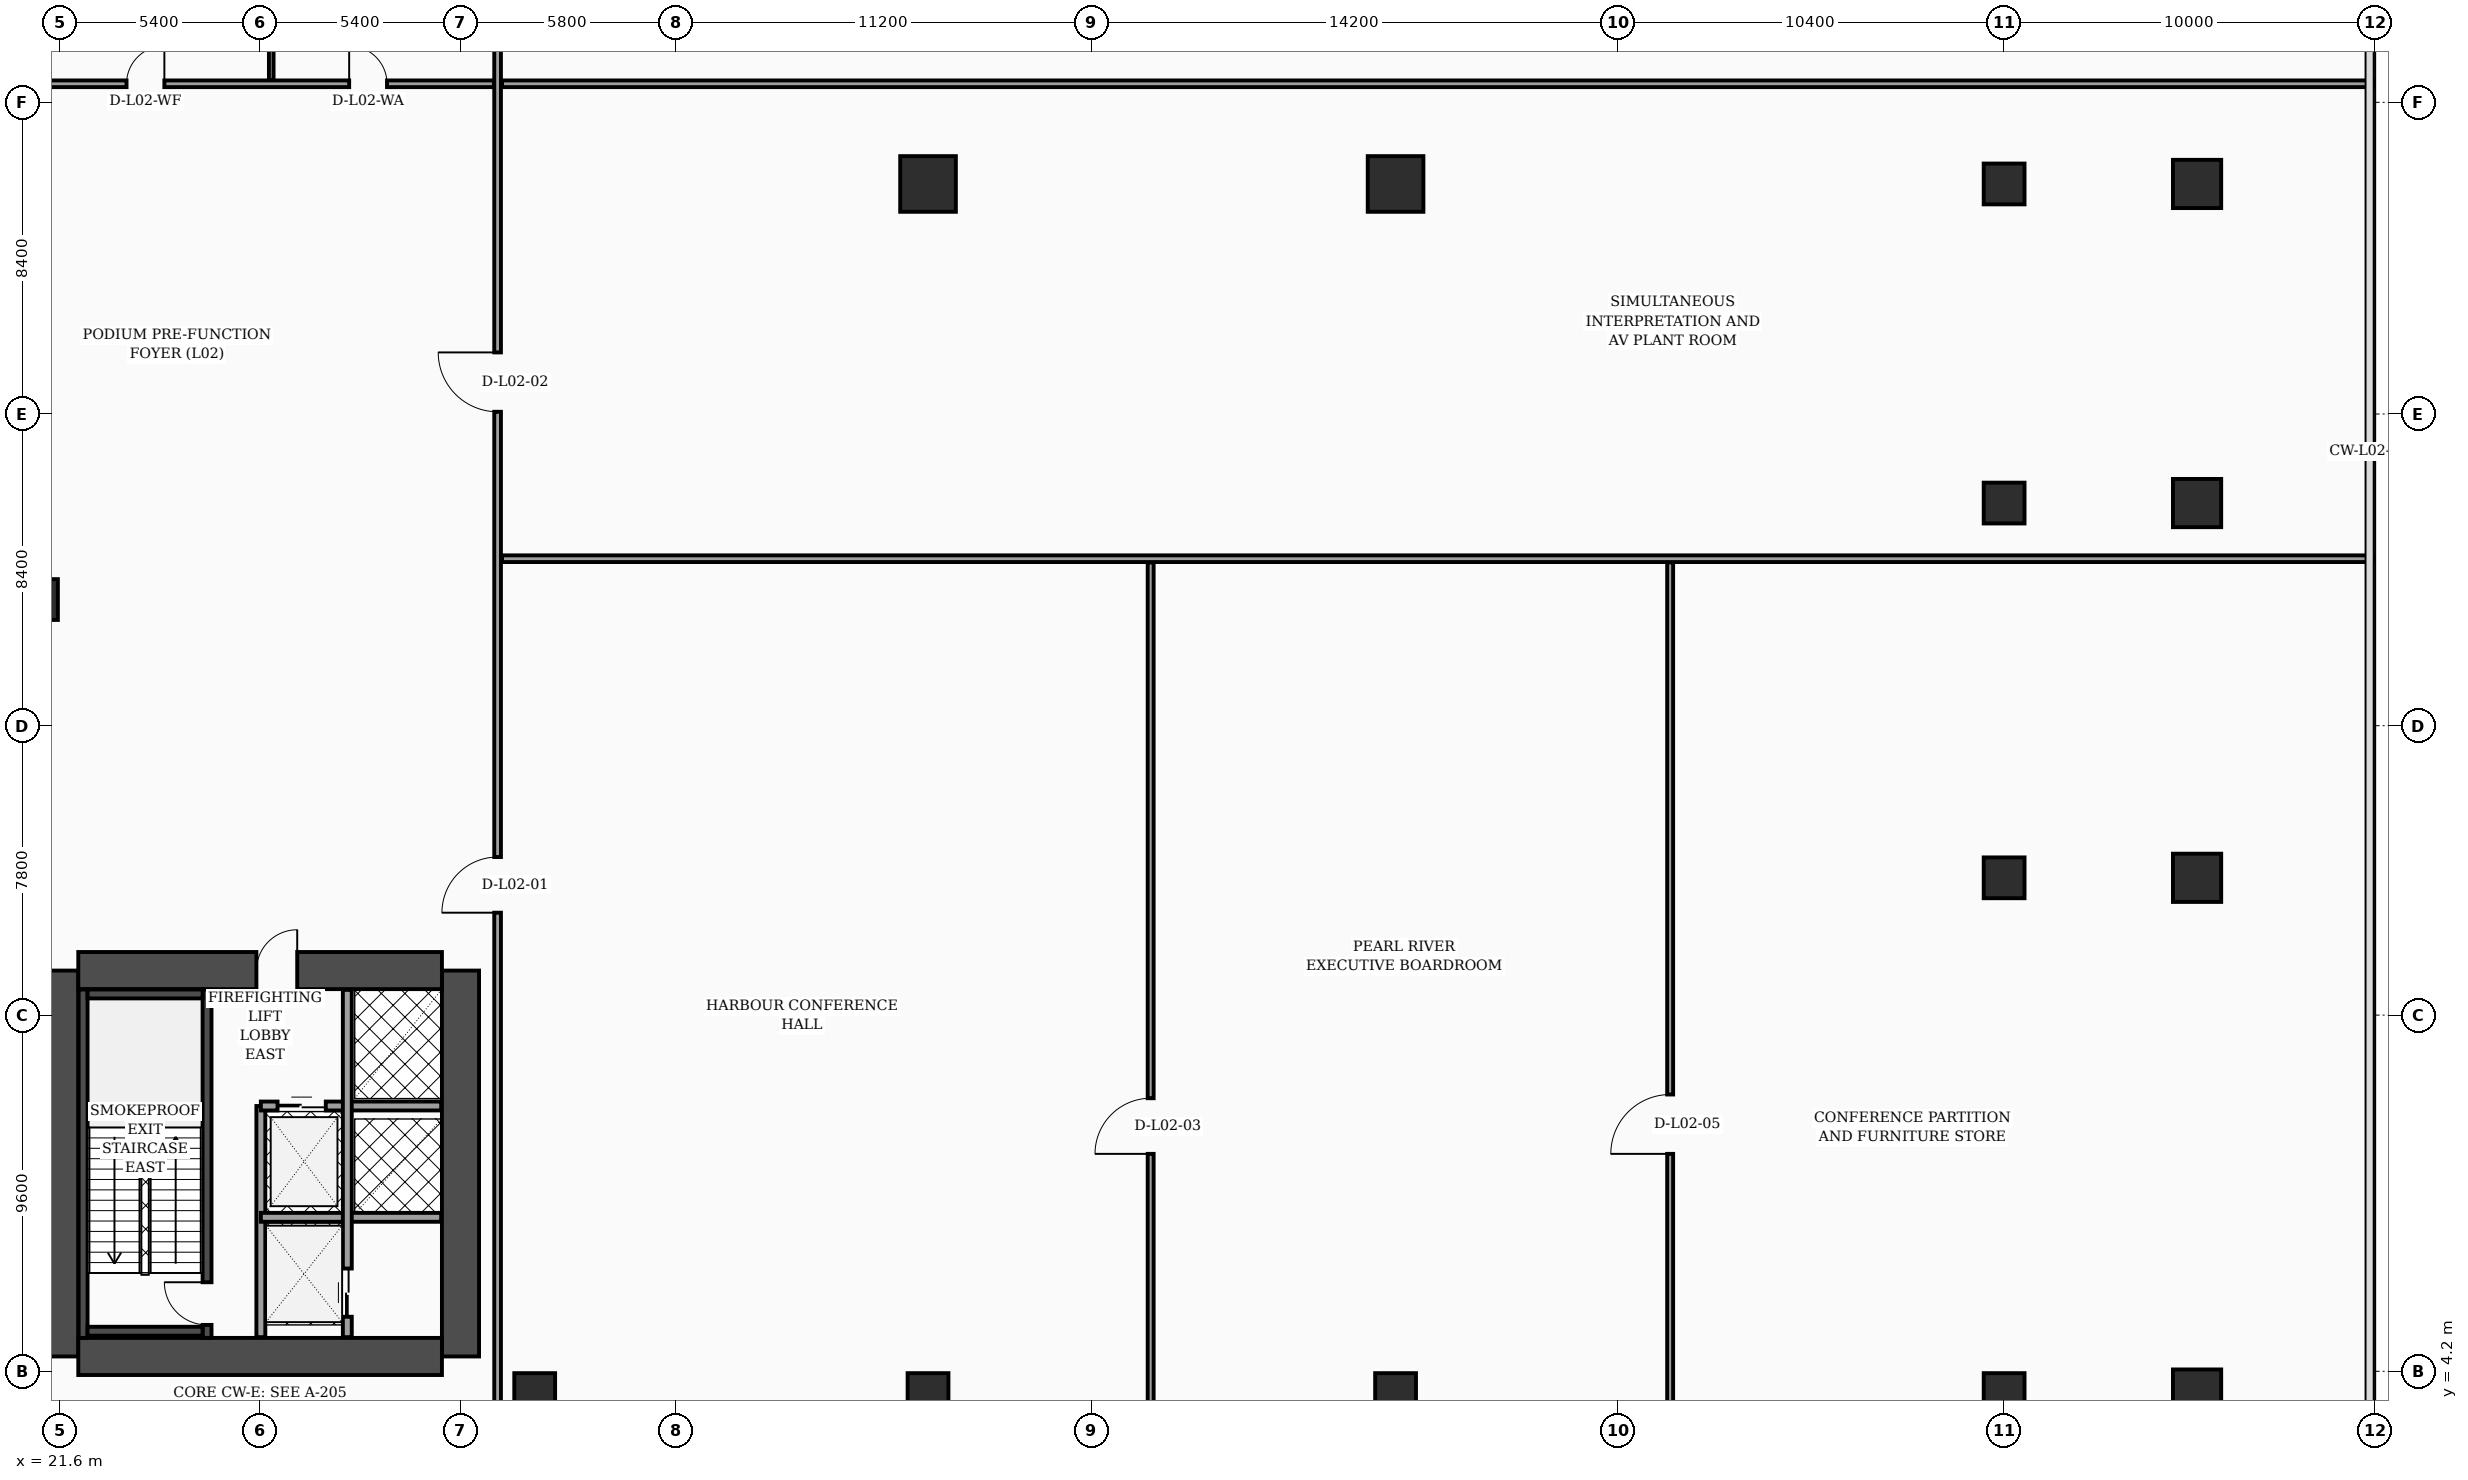
"""IFC4 building model, lengths in metres.
Left out: names, types, materials, properties, quantities, classifications, styles, units other than length and angle.
Written with IfcOpenShell. Run it as: python <this file> out.ifc"""

import sys

from ifc_helpers import new_model, si_unit, direction, frame, frame_2d, origin, origin_2d, place, context, subcontext, project, spatial, rectangle, hollow_rectangle, circle, extrude, element, fill, save


model = new_model("IFC4")
c1 = context("Model", 3, precision=1e-05, world=origin(), true_north=direction((0.0, 1.0)))
c2 = subcontext(c1, "Body", "Model", "MODEL_VIEW")
j1 = project(units=[si_unit("LENGTHUNIT", "METRE"), si_unit("PLANEANGLEUNIT", "RADIAN")], contexts=[c1])
p1 = place(None, origin())
s1 = spatial("IfcSite", under=j1, at=p1, CompositionType="ELEMENT")
p2 = place(p1, origin())
s2 = spatial("IfcBuilding", under=s1, at=p2, CompositionType="ELEMENT")
p3 = place(p2, frame((0.0, 0.0, 12.0)))
s3 = spatial("IfcBuildingStorey", under=s2, at=p3, CompositionType="ELEMENT", Elevation=12.0)
for number, where, z_axis, x_axis in (
    (1, (21.6, 4.6, 0.0), (0.0, 0.0, 1.0), (0.0, 1.0, 0.0)),
    (2, (32.4, 4.6, 0.0), (0.0, 0.0, 1.0), (0.0, 1.0, 0.0)),
):
    element("IfcWall", number, at=place(p3, frame(where, z_axis=z_axis, x_axis=x_axis)), inside=s3, PredefinedType="SHEAR", context=c2, shape_type="SweptSolid", body=[
        extrude(rectangle(XDim=10.4, YDim=1.0, at=frame_2d((5.2, 0.0))), origin(), (0.0, 0.0, 1.0), 4.68),
    ])
p4 = place(p3, frame((22.1, 15.0, 0.0), z_axis=(0.0, 0.0, 1.0), x_axis=(1.0, 0.0, 0.0)))
e3 = element("IfcWall", 3, at=p4, inside=s3, PredefinedType="SHEAR", context=c2, shape_type="SweptSolid", body=[
    extrude(rectangle(XDim=9.8, YDim=1.0, at=frame_2d((4.9, 0.0))), origin(), (0.0, 0.0, 1.0), 4.68),
])
p5 = place(p4, frame((4.8, 0.0, 0.0)))
e4 = element("IfcOpeningElement", 4, at=p5, cuts=e3, PredefinedType="OPENING", context=c2, shape_type="SweptSolid", body=[
    extrude(rectangle(XDim=1.1, YDim=2.2, at=frame_2d((0.55, 1.1))), frame((0.0, 0.51, 0.0), z_axis=(0.0, -1.0, 0.0), x_axis=(1.0, 0.0, 0.0)), (0.0, 0.0, 1.0), 1.02),
])
p6 = place(p3, frame((22.1, 4.6, 0.0), z_axis=(0.0, 0.0, 1.0), x_axis=(1.0, 0.0, 0.0)))
e5 = element("IfcWall", 5, at=p6, inside=s3, PredefinedType="SHEAR", context=c2, shape_type="SweptSolid", body=[
    extrude(rectangle(XDim=9.8, YDim=1.0, at=frame_2d((4.9, 0.0))), origin(), (0.0, 0.0, 1.0), 4.68),
])
p7 = place(p3, frame((22.23, 5.1, 0.0), z_axis=(0.0, 0.0, 1.0), x_axis=(0.0, 1.0, 0.0)))
e6 = element("IfcWall", 6, at=p7, inside=s3, PredefinedType="SOLIDWALL", context=c2, shape_type="SweptSolid", body=[
    extrude(rectangle(XDim=9.39, YDim=0.24, at=frame_2d((4.695, 0.0))), origin(), (0.0, 0.0, 1.0), 4.68),
])
p8 = place(p3, frame((25.57, 5.1, 0.0), z_axis=(0.0, 0.0, 1.0), x_axis=(0.0, 1.0, 0.0)))
e7 = element("IfcWall", 7, at=p8, inside=s3, PredefinedType="SOLIDWALL", context=c2, shape_type="SweptSolid", body=[
    extrude(rectangle(XDim=9.39, YDim=0.24, at=frame_2d((4.695, 0.0))), origin(), (0.0, 0.0, 1.0), 4.68),
])
p9 = place(p8, frame((0.35, 0.0, 0.0)))
e8 = element("IfcOpeningElement", 8, at=p9, cuts=e7, PredefinedType="OPENING", context=c2, shape_type="SweptSolid", body=[
    extrude(rectangle(XDim=1.15, YDim=2.2, at=frame_2d((0.575, 1.1))), frame((0.0, 0.13, 0.0), z_axis=(0.0, -1.0, 0.0), x_axis=(1.0, 0.0, 0.0)), (0.0, 0.0, 1.0), 0.26),
])
for number, where, z_axis, x_axis in (
    (9, (22.35, 5.28, 0.0), (0.0, 0.0, 1.0), (1.0, 0.0, 0.0)),
    (10, (22.35, 14.37, 0.0), (0.0, 0.0, 1.0), (1.0, 0.0, 0.0)),
):
    element("IfcWall", number, at=place(p3, frame(where, z_axis=z_axis, x_axis=x_axis)), inside=s3, PredefinedType="SOLIDWALL", context=c2, shape_type="SweptSolid", body=[
        extrude(rectangle(XDim=3.1, YDim=0.24, at=frame_2d((1.55, 0.0))), origin(), (0.0, 0.0, 1.0), 4.68),
    ])
for number, where, z_axis, x_axis in (
    (11, (21.0, 25.0, 0.0), (0.0, 0.0, 1.0), (1.0, 0.0, 0.0)),
    (12, (34.4, 3.6, 0.0), (0.0, 0.0, 1.0), (1.0, 0.0, 0.0)),
    (13, (45.0, 3.6, 0.0), (0.0, 0.0, 1.0), (1.0, 0.0, 0.0)),
    (14, (57.6, 3.6, 0.0), (0.0, 0.0, 1.0), (1.0, 0.0, 0.0)),
    (15, (74.0, 3.6, 0.0), (0.0, 0.0, 1.0), (1.0, 0.0, 0.0)),
    (16, (74.0, 17.5, 0.0), (0.0, 0.0, 1.0), (1.0, 0.0, 0.0)),
    (17, (74.0, 27.6, 0.0), (0.0, 0.0, 1.0), (1.0, 0.0, 0.0)),
    (18, (74.0, 36.2, 0.0), (0.0, 0.0, 1.0), (1.0, 0.0, 0.0)),
):
    element("IfcColumn", number, at=place(p3, frame(where, z_axis=z_axis, x_axis=x_axis)), inside=s3, PredefinedType="COLUMN", context=c2, shape_type="SweptSolid", body=[
        extrude(hollow_rectangle(XDim=1.1, YDim=1.1, WallThickness=0.045, at=origin_2d()), origin(), (0.0, 0.0, 1.0), 4.68),
    ])
for number, where, z_axis, x_axis in (
    (19, (45.0, 36.2, 0.0), (0.0, 0.0, 1.0), (1.0, 0.0, 0.0)),
    (20, (57.6, 36.2, 0.0), (0.0, 0.0, 1.0), (1.0, 0.0, 0.0)),
):
    element("IfcColumn", number, at=place(p3, frame(where, z_axis=z_axis, x_axis=x_axis)), inside=s3, PredefinedType="COLUMN", context=c2, shape_type="SweptSolid", body=[
        extrude(rectangle(XDim=1.5, YDim=1.5, at=origin_2d()), origin(), (0.0, 0.0, 1.0), 4.68),
    ])
for number, where, z_axis, x_axis in (
    (21, (79.2, 3.6, 0.0), (0.0, 0.0, 1.0), (1.0, 0.0, 0.0)),
    (22, (79.2, 17.5, 0.0), (0.0, 0.0, 1.0), (1.0, 0.0, 0.0)),
    (23, (79.2, 27.6, 0.0), (0.0, 0.0, 1.0), (1.0, 0.0, 0.0)),
    (24, (79.2, 36.2, 0.0), (0.0, 0.0, 1.0), (1.0, 0.0, 0.0)),
):
    element("IfcColumn", number, at=place(p3, frame(where, z_axis=z_axis, x_axis=x_axis)), inside=s3, PredefinedType="COLUMN", context=c2, shape_type="SweptSolid", body=[
        extrude(circle(Radius=0.65, at=origin_2d()), origin(), (0.0, 0.0, 1.0), 4.68),
    ])
p10 = place(p3, frame((27.02, 5.12, 0.0), z_axis=(0.0, 0.0, 1.0), x_axis=(0.0, 1.0, 0.0)))
e25 = element("IfcWall", 25, at=p10, inside=s3, PredefinedType="SOLIDWALL", context=c2, shape_type="SweptSolid", body=[
    extrude(rectangle(XDim=6.23, YDim=0.24, at=frame_2d((3.115, 0.0))), origin(), (0.0, 0.0, 1.0), 4.68),
])
p11 = place(p3, frame((27.02, 11.35, 0.0), z_axis=(0.0, 0.0, 1.0), x_axis=(1.0, 0.0, 0.0)))
e26 = element("IfcWall", 26, at=p11, inside=s3, PredefinedType="SOLIDWALL", context=c2, shape_type="SweptSolid", body=[
    extrude(rectangle(XDim=4.86, YDim=0.24, at=frame_2d((2.43, 0.0))), origin(), (0.0, 0.0, 1.0), 4.68),
])
p12 = place(p11, frame((0.45, 0.0, 0.0)))
e27 = element("IfcOpeningElement", 27, at=p12, cuts=e26, PredefinedType="OPENING", context=c2, shape_type="SweptSolid", body=[
    extrude(rectangle(XDim=1.3, YDim=2.35, at=frame_2d((0.65, 1.175))), frame((0.0, 0.13, 0.0), z_axis=(0.0, -1.0, 0.0), x_axis=(1.0, 0.0, 0.0)), (0.0, 0.0, 1.0), 0.26),
])
p13 = place(p3, frame((27.02, 8.35, 0.0), z_axis=(0.0, 0.0, 1.0), x_axis=(1.0, 0.0, 0.0)))
e28 = element("IfcWall", 28, at=p13, inside=s3, PredefinedType="SOLIDWALL", context=c2, shape_type="SweptSolid", body=[
    extrude(rectangle(XDim=4.86, YDim=0.24, at=frame_2d((2.43, 0.0))), origin(), (0.0, 0.0, 1.0), 4.68),
])
p14 = place(p3, frame((29.35, 5.12, 0.0), z_axis=(0.0, 0.0, 1.0), x_axis=(0.0, 1.0, 0.0)))
e29 = element("IfcWall", 29, at=p14, inside=s3, PredefinedType="SOLIDWALL", context=c2, shape_type="SweptSolid", body=[
    extrude(rectangle(XDim=9.36, YDim=0.24, at=frame_2d((4.68, 0.0))), origin(), (0.0, 0.0, 1.0), 4.68),
])
p15 = place(p14, frame((0.55, 0.0, 0.0)))
e30 = element("IfcOpeningElement", 30, at=p15, cuts=e29, PredefinedType="OPENING", context=c2, shape_type="SweptSolid", body=[
    extrude(rectangle(XDim=1.3, YDim=2.35, at=frame_2d((0.65, 1.175))), frame((0.0, 0.13, 0.0), z_axis=(0.0, -1.0, 0.0), x_axis=(1.0, 0.0, 0.0)), (0.0, 0.0, 1.0), 0.26),
])
p16 = place(p3, frame((15.2, 38.9, 0.0), z_axis=(0.0, 0.0, 1.0), x_axis=(1.0, 0.0, 0.0)))
e31 = element("IfcWall", 31, at=p16, inside=s3, PredefinedType="PARTITIONING", context=c2, shape_type="SweptSolid", body=[
    extrude(rectangle(XDim=18.1, YDim=0.18, at=frame_2d((9.05, 0.0))), origin(), (0.0, 0.0, 1.0), 3.88),
])
p17 = place(p16, frame((2.2, 0.0, 0.0)))
e32 = element("IfcOpeningElement", 32, at=p17, cuts=e31, PredefinedType="OPENING", context=c2, shape_type="SweptSolid", body=[
    extrude(rectangle(XDim=1.02, YDim=2.2, at=frame_2d((0.51, 1.1))), frame((0.0, 0.1, 0.0), z_axis=(0.0, -1.0, 0.0), x_axis=(1.0, 0.0, 0.0)), (0.0, 0.0, 1.0), 0.2),
])
p18 = place(p16, frame((8.2, 0.0, 0.0)))
e33 = element("IfcOpeningElement", 33, at=p18, cuts=e31, PredefinedType="OPENING", context=c2, shape_type="SweptSolid", body=[
    extrude(rectangle(XDim=1.02, YDim=2.2, at=frame_2d((0.51, 1.1))), frame((0.0, 0.1, 0.0), z_axis=(0.0, -1.0, 0.0), x_axis=(1.0, 0.0, 0.0)), (0.0, 0.0, 1.0), 0.2),
])
p19 = place(p16, frame((14.2, 0.0, 0.0)))
e34 = element("IfcOpeningElement", 34, at=p19, cuts=e31, PredefinedType="OPENING", context=c2, shape_type="SweptSolid", body=[
    extrude(rectangle(XDim=1.02, YDim=2.2, at=frame_2d((0.51, 1.1))), frame((0.0, 0.1, 0.0), z_axis=(0.0, -1.0, 0.0), x_axis=(1.0, 0.0, 0.0)), (0.0, 0.0, 1.0), 0.2),
])
p20 = place(p3, frame((27.3, 39.0, 0.0), z_axis=(0.0, 0.0, 1.0), x_axis=(0.0, 1.0, 0.0)))
e35 = element("IfcWall", 35, at=p20, inside=s3, PredefinedType="PARTITIONING", context=c2, shape_type="SweptSolid", body=[
    extrude(rectangle(XDim=6.2, YDim=0.125, at=frame_2d((3.1, 0.0))), origin(), (0.0, 0.0, 1.0), 4.68),
])
p21 = place(p3, frame((33.4, 0.06, 0.0), z_axis=(0.0, 0.0, 1.0), x_axis=(0.0, 1.0, 0.0)))
e36 = element("IfcWall", 36, at=p21, inside=s3, PredefinedType="PARTITIONING", context=c2, shape_type="SweptSolid", body=[
    extrude(rectangle(XDim=57.88, YDim=0.18, at=frame_2d((28.94, 0.0))), origin(), (0.0, 0.0, 1.0), 3.88),
])
p22 = place(p21, frame((16.5, 0.0, 0.0)))
e37 = element("IfcOpeningElement", 37, at=p22, cuts=e36, PredefinedType="OPENING", context=c2, shape_type="SweptSolid", body=[
    extrude(rectangle(XDim=1.5, YDim=2.22, at=frame_2d((0.75, 1.11))), frame((0.0, 0.1, 0.0), z_axis=(0.0, -1.0, 0.0), x_axis=(1.0, 0.0, 0.0)), (0.0, 0.0, 1.0), 0.2),
])
p23 = place(p21, frame((30.0, 0.0, 0.0)))
e38 = element("IfcOpeningElement", 38, at=p23, cuts=e36, PredefinedType="OPENING", context=c2, shape_type="SweptSolid", body=[
    extrude(rectangle(XDim=1.6, YDim=2.35, at=frame_2d((0.8, 1.175))), frame((0.0, 0.1, 0.0), z_axis=(0.0, -1.0, 0.0), x_axis=(1.0, 0.0, 0.0)), (0.0, 0.0, 1.0), 0.2),
])
p24 = place(p3, frame((51.0, 0.06, 0.0), z_axis=(0.0, 0.0, 1.0), x_axis=(0.0, 1.0, 0.0)))
e39 = element("IfcWall", 39, at=p24, inside=s3, PredefinedType="PARTITIONING", context=c2, shape_type="SweptSolid", body=[
    extrude(rectangle(XDim=25.94, YDim=0.16, at=frame_2d((12.97, 0.0))), origin(), (0.0, 0.0, 1.0), 4.18),
])
p25 = place(p24, frame((10.0, 0.0, 0.0)))
e40 = element("IfcOpeningElement", 40, at=p25, cuts=e39, PredefinedType="OPENING", context=c2, shape_type="SweptSolid", body=[
    extrude(rectangle(XDim=1.5, YDim=2.22, at=frame_2d((0.75, 1.11))), frame((0.0, 0.09, 0.0), z_axis=(0.0, -1.0, 0.0), x_axis=(1.0, 0.0, 0.0)), (0.0, 0.0, 1.0), 0.18),
])
p26 = place(p3, frame((65.0, 0.06, 0.0), z_axis=(0.0, 0.0, 1.0), x_axis=(0.0, 1.0, 0.0)))
e41 = element("IfcWall", 41, at=p26, inside=s3, PredefinedType="PARTITIONING", context=c2, shape_type="SweptSolid", body=[
    extrude(rectangle(XDim=25.94, YDim=0.16, at=frame_2d((12.97, 0.0))), origin(), (0.0, 0.0, 1.0), 4.18),
])
p27 = place(p26, frame((10.0, 0.0, 0.0)))
e42 = element("IfcOpeningElement", 42, at=p27, cuts=e41, PredefinedType="OPENING", context=c2, shape_type="SweptSolid", body=[
    extrude(rectangle(XDim=1.6, YDim=2.35, at=frame_2d((0.8, 1.175))), frame((0.0, 0.09, 0.0), z_axis=(0.0, -1.0, 0.0), x_axis=(1.0, 0.0, 0.0)), (0.0, 0.0, 1.0), 0.18),
])
p28 = place(p3, frame((33.52, 26.1, 0.0), z_axis=(0.0, 0.0, 1.0), x_axis=(1.0, 0.0, 0.0)))
e43 = element("IfcWall", 43, at=p28, inside=s3, PredefinedType="PARTITIONING", context=c2, shape_type="SweptSolid", body=[
    extrude(rectangle(XDim=50.42, YDim=0.18, at=frame_2d((25.21, 0.0))), origin(), (0.0, 0.0, 1.0), 3.18),
])
p29 = place(p3, frame((33.52, 38.9, 0.0), z_axis=(0.0, 0.0, 1.0), x_axis=(1.0, 0.0, 0.0)))
e44 = element("IfcWall", 44, at=p29, inside=s3, PredefinedType="PARTITIONING", context=c2, shape_type="SweptSolid", body=[
    extrude(rectangle(XDim=50.42, YDim=0.18, at=frame_2d((25.21, 0.0))), origin(), (0.0, 0.0, 1.0), 3.88),
])
p30 = place(p12, origin())
e45 = element("IfcDoor", 45, at=p30, inside=s3, OperationType="DOUBLE_DOOR_SLIDING", PredefinedType="DOOR", context=c2, shape_type="SweptSolid", body=[
    extrude(rectangle(XDim=1.3, YDim=2.35, at=frame_2d((0.65, 1.175))), frame((0.0, 0.025, 0.0), z_axis=(0.0, -1.0, 0.0), x_axis=(1.0, 0.0, 0.0)), (0.0, 0.0, 1.0), 0.05),
])
fill(e27, e45)
p31 = place(p15, origin())
e46 = element("IfcDoor", 46, at=p31, inside=s3, OperationType="DOUBLE_DOOR_SLIDING", PredefinedType="DOOR", context=c2, shape_type="SweptSolid", body=[
    extrude(rectangle(XDim=1.3, YDim=2.35, at=frame_2d((0.65, 1.175))), frame((0.0, 0.025, 0.0), z_axis=(0.0, -1.0, 0.0), x_axis=(1.0, 0.0, 0.0)), (0.0, 0.0, 1.0), 0.05),
])
fill(e30, e46)
p32 = place(p18, origin())
e47 = element("IfcDoor", 47, at=p32, inside=s3, OperationType="SINGLE_SWING_RIGHT", PredefinedType="DOOR", context=c2, shape_type="SweptSolid", body=[
    extrude(rectangle(XDim=1.02, YDim=2.2, at=frame_2d((0.51, 1.1))), frame((0.0, 0.025, 0.0), z_axis=(0.0, -1.0, 0.0), x_axis=(1.0, 0.0, 0.0)), (0.0, 0.0, 1.0), 0.05),
])
fill(e33, e47)
p33 = place(p19, origin())
e48 = element("IfcDoor", 48, at=p33, inside=s3, OperationType="SINGLE_SWING_LEFT", PredefinedType="DOOR", context=c2, shape_type="SweptSolid", body=[
    extrude(rectangle(XDim=1.02, YDim=2.2, at=frame_2d((0.51, 1.1))), frame((0.0, 0.025, 0.0), z_axis=(0.0, -1.0, 0.0), x_axis=(1.0, 0.0, 0.0)), (0.0, 0.0, 1.0), 0.05),
])
fill(e34, e48)
p34 = place(p22, origin())
e49 = element("IfcDoor", 49, at=p34, inside=s3, OperationType="SINGLE_SWING_LEFT", PredefinedType="DOOR", context=c2, shape_type="SweptSolid", body=[
    extrude(rectangle(XDim=1.5, YDim=2.22, at=frame_2d((0.75, 1.11))), frame((0.0, 0.025, 0.0), z_axis=(0.0, -1.0, 0.0), x_axis=(1.0, 0.0, 0.0)), (0.0, 0.0, 1.0), 0.05),
])
fill(e37, e49)
p35 = place(p23, origin())
e50 = element("IfcDoor", 50, at=p35, inside=s3, OperationType="SINGLE_SWING_RIGHT", PredefinedType="DOOR", context=c2, shape_type="SweptSolid", body=[
    extrude(rectangle(XDim=1.6, YDim=2.35, at=frame_2d((0.8, 1.175))), frame((0.0, 0.025, 0.0), z_axis=(0.0, -1.0, 0.0), x_axis=(1.0, 0.0, 0.0)), (0.0, 0.0, 1.0), 0.05),
])
fill(e38, e50)
p36 = place(p25, origin())
e51 = element("IfcDoor", 51, at=p36, inside=s3, OperationType="SINGLE_SWING_LEFT", PredefinedType="DOOR", context=c2, shape_type="SweptSolid", body=[
    extrude(rectangle(XDim=1.5, YDim=2.22, at=frame_2d((0.75, 1.11))), frame((0.0, 0.025, 0.0), z_axis=(0.0, -1.0, 0.0), x_axis=(1.0, 0.0, 0.0)), (0.0, 0.0, 1.0), 0.05),
])
fill(e40, e51)
p37 = place(p27, origin())
e52 = element("IfcDoor", 52, at=p37, inside=s3, OperationType="SINGLE_SWING_LEFT", PredefinedType="DOOR", context=c2, shape_type="SweptSolid", body=[
    extrude(rectangle(XDim=1.6, YDim=2.35, at=frame_2d((0.8, 1.175))), frame((0.0, 0.025, 0.0), z_axis=(0.0, -1.0, 0.0), x_axis=(1.0, 0.0, 0.0)), (0.0, 0.0, 1.0), 0.05),
])
fill(e42, e52)
p38 = place(p9, origin())
e53 = element("IfcDoor", 53, at=p38, inside=s3, OperationType="SINGLE_SWING_RIGHT", PredefinedType="DOOR", context=c2, shape_type="SweptSolid", body=[
    extrude(rectangle(XDim=1.15, YDim=2.2, at=frame_2d((0.575, 1.1))), frame((0.0, 0.025, 0.0), z_axis=(0.0, -1.0, 0.0), x_axis=(1.0, 0.0, 0.0)), (0.0, 0.0, 1.0), 0.05),
])
fill(e8, e53)
p39 = place(p5, origin())
e54 = element("IfcDoor", 54, at=p39, inside=s3, OperationType="SINGLE_SWING_RIGHT", PredefinedType="DOOR", context=c2, shape_type="SweptSolid", body=[
    extrude(rectangle(XDim=1.1, YDim=2.2, at=frame_2d((0.55, 1.1))), frame((0.0, 0.025, 0.0), z_axis=(0.0, -1.0, 0.0), x_axis=(1.0, 0.0, 0.0)), (0.0, 0.0, 1.0), 0.05),
])
fill(e4, e54)
save(model, sys.argv[1])
